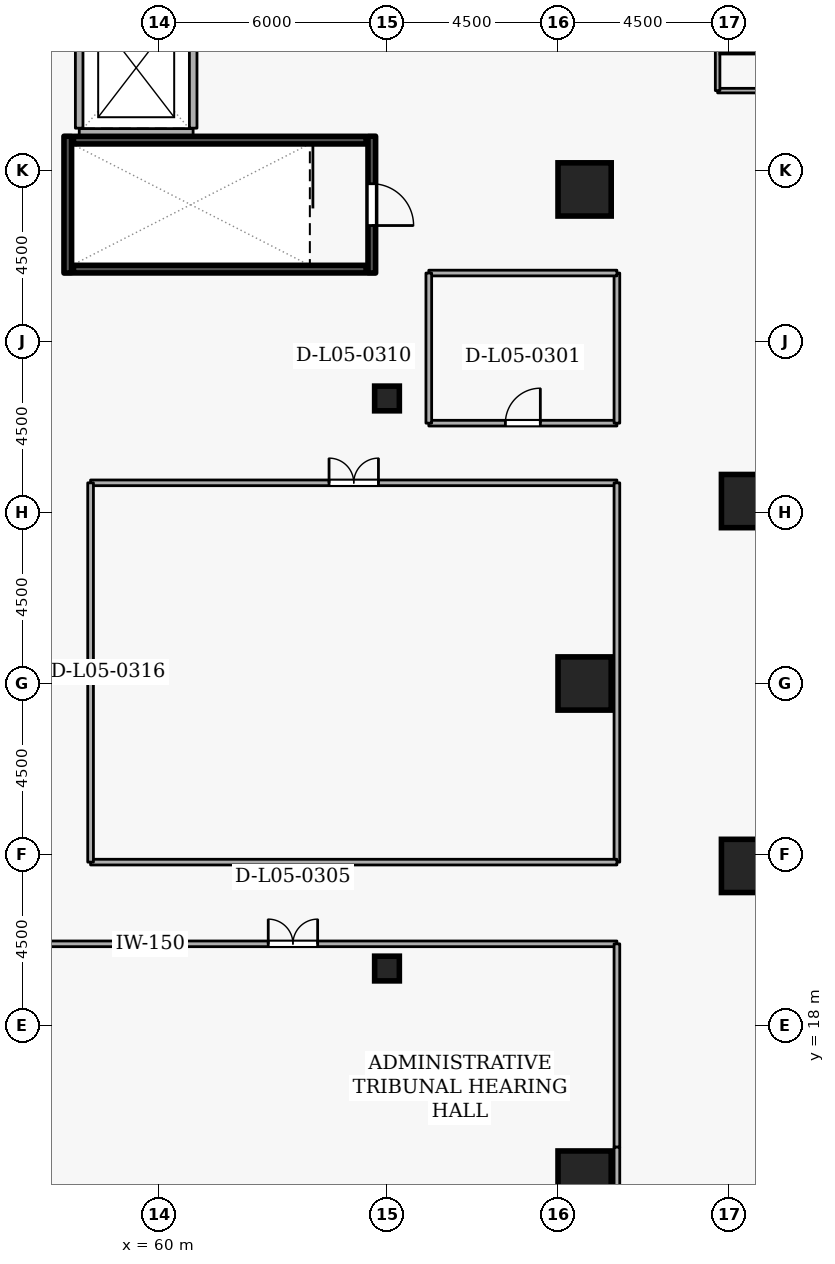
"""IFC4 building model, lengths in metres.
Left out: names, types, materials, properties, quantities, classifications, styles, units other than length and angle.
Written with IfcOpenShell. Run it as: python <this file> out.ifc"""

import sys

from ifc_helpers import new_model, si_unit, direction, frame, frame_2d, origin, origin_2d, place, context, subcontext, project, spatial, rectangle, extrude, element, fill, save


model = new_model("IFC4")
c1 = context("Model", 3, precision=1e-05, world=origin(), true_north=direction((0.0, 1.0)))
c2 = subcontext(c1, "Body", "Model", "MODEL_VIEW")
j1 = project(units=[si_unit("LENGTHUNIT", "METRE"), si_unit("PLANEANGLEUNIT", "RADIAN")], contexts=[c1])
p1 = place(None, origin())
s1 = spatial("IfcSite", under=j1, at=p1, CompositionType="ELEMENT")
p2 = place(p1, origin())
s2 = spatial("IfcBuilding", under=s1, at=p2, CompositionType="ELEMENT")
p3 = place(p2, frame((0.0, 0.0, 23.1)))
s3 = spatial("IfcBuildingStorey", under=s2, at=p3, CompositionType="ELEMENT", Elevation=23.1)
for number, where, z_axis, x_axis in (
    (1, (71.2, 14.0, 0.0), (0.0, 0.0, 1.0), (1.0, 0.0, 0.0)),
    (2, (71.2, 27.0, 0.0), (0.0, 0.0, 1.0), (1.0, 0.0, 0.0)),
    (3, (71.2, 40.0, 0.0), (0.0, 0.0, 1.0), (1.0, 0.0, 0.0)),
    (4, (75.5, 22.2, 0.0), (0.0, 0.0, 1.0), (1.0, 0.0, 0.0)),
    (5, (75.5, 31.8, 0.0), (0.0, 0.0, 1.0), (1.0, 0.0, 0.0)),
):
    element("IfcColumn", number, at=place(p3, frame(where, z_axis=z_axis, x_axis=x_axis)), inside=s3, PredefinedType="COLUMN", context=c2, shape_type="SweptSolid", body=[
        extrude(rectangle(XDim=1.4, YDim=1.4, at=origin_2d()), origin(), (0.0, 0.0, 1.0), 4.8),
    ])
for number, where, z_axis, x_axis in (
    (6, (66.0, 19.5, 0.0), (0.0, 0.0, 1.0), (1.0, 0.0, 0.0)),
    (7, (66.0, 34.5, 0.0), (0.0, 0.0, 1.0), (1.0, 0.0, 0.0)),
):
    element("IfcColumn", number, at=place(p3, frame(where, z_axis=z_axis, x_axis=x_axis)), inside=s3, PredefinedType="COLUMN", context=c2, shape_type="SweptSolid", body=[
        extrude(rectangle(XDim=0.65, YDim=0.65, at=origin_2d()), origin(), (0.0, 0.0, 1.0), 4.8),
    ])
p4 = place(p3, frame((57.902, 41.5, 0.0), z_axis=(0.0, 0.0, 1.0), x_axis=(1.0, 0.0, 0.0)))
e8 = element("IfcWall", 8, at=p4, inside=s3, PredefinedType="STANDARD", context=c2, shape_type="SweptSolid", body=[
    extrude(rectangle(XDim=2.996, YDim=0.2, at=frame_2d((1.498, 0.0))), origin(), (0.0, 0.0, 1.0), 4.54),
])
for number, where, z_axis, x_axis in (
    (9, (60.9, 41.612, 0.0), (0.0, 0.0, 1.0), (0.0, 1.0, 0.0)),
    (10, (57.9, 41.612, 0.0), (0.0, 0.0, 1.0), (0.0, 1.0, 0.0)),
):
    element("IfcWall", number, at=place(p3, frame(where, z_axis=z_axis, x_axis=x_axis)), inside=s3, PredefinedType="STANDARD", context=c2, shape_type="SweptSolid", body=[
        extrude(rectangle(XDim=3.286, YDim=0.2, at=frame_2d((1.643, 0.0))), origin(), (0.0, 0.0, 1.0), 4.54),
    ])
p5 = place(p3, frame((65.6, 41.4, 0.0), z_axis=(0.0, 0.0, 1.0), x_axis=(0.0, -1.0, 0.0)))
e11 = element("IfcWall", 11, at=p5, inside=s3, PredefinedType="SHEAR", context=c2, shape_type="SweptSolid", body=[
    extrude(rectangle(XDim=3.6, YDim=0.2, at=frame_2d((1.8, 0.0))), origin(), (0.0, 0.0, 1.0), 4.8),
])
p6 = place(p5, frame((1.25, 0.0, 0.0)))
e12 = element("IfcOpeningElement", 12, at=p6, cuts=e11, PredefinedType="OPENING", context=c2, shape_type="SweptSolid", body=[
    extrude(rectangle(XDim=1.1, YDim=2.1, at=frame_2d((0.55, 1.05))), frame((0.0, 0.11, 0.0), z_axis=(0.0, -1.0, 0.0), x_axis=(1.0, 0.0, 0.0)), (0.0, 0.0, 1.0), 0.22),
])
p7 = place(p3, frame((57.6, 37.8, 0.0), z_axis=(0.0, 0.0, 1.0), x_axis=(0.0, 1.0, 0.0)))
e13 = element("IfcWall", 13, at=p7, inside=s3, PredefinedType="SHEAR", context=c2, shape_type="SweptSolid", body=[
    extrude(rectangle(XDim=3.6, YDim=0.2, at=frame_2d((1.8, 0.0))), origin(), (0.0, 0.0, 1.0), 4.8),
])
for number, where, z_axis, x_axis in (
    (14, (57.75, 37.903, 0.0), (0.0, 0.0, 1.0), (1.0, 0.0, 0.0)),
    (15, (65.45, 41.297, 0.0), (0.0, 0.0, 1.0), (-1.0, 0.0, 0.0)),
):
    element("IfcWall", number, at=place(p3, frame(where, z_axis=z_axis, x_axis=x_axis)), inside=s3, PredefinedType="SHEAR", context=c2, shape_type="SweptSolid", body=[
        extrude(rectangle(XDim=7.7, YDim=0.2, at=frame_2d((3.85, 0.0))), origin(), (0.0, 0.0, 1.0), 4.8),
    ])
p8 = place(p3, frame((67.1, 33.85, 0.0), z_axis=(0.0, 0.0, 1.0), x_axis=(1.0, 0.0, 0.0)))
e16 = element("IfcWall", 16, at=p8, inside=s3, PredefinedType="PARTITIONING", context=c2, shape_type="SweptSolid", body=[
    extrude(rectangle(XDim=4.95, YDim=0.15, at=frame_2d((2.475, 0.0))), origin(), (0.0, 0.0, 1.0), 4.54),
])
p9 = place(p8, frame((2.015, 0.0, 0.0)))
e17 = element("IfcOpeningElement", 17, at=p9, cuts=e16, PredefinedType="OPENING", context=c2, shape_type="SweptSolid", body=[
    extrude(rectangle(XDim=0.92, YDim=2.08, at=frame_2d((0.46, 1.04))), frame((0.0, 0.085, 0.0), z_axis=(0.0, -1.0, 0.0), x_axis=(1.0, 0.0, 0.0)), (0.0, 0.0, 1.0), 0.17),
])
p10 = place(p3, frame((72.05, 33.85, 0.0), z_axis=(0.0, 0.0, 1.0), x_axis=(0.0, 1.0, 0.0)))
e18 = element("IfcWall", 18, at=p10, inside=s3, PredefinedType="PARTITIONING", context=c2, shape_type="SweptSolid", body=[
    extrude(rectangle(XDim=3.95, YDim=0.15, at=frame_2d((1.975, 0.0))), origin(), (0.0, 0.0, 1.0), 4.54),
])
p11 = place(p3, frame((72.05, 37.8, 0.0), z_axis=(0.0, 0.0, 1.0), x_axis=(-1.0, 0.0, 0.0)))
e19 = element("IfcWall", 19, at=p11, inside=s3, PredefinedType="PARTITIONING", context=c2, shape_type="SweptSolid", body=[
    extrude(rectangle(XDim=4.95, YDim=0.15, at=frame_2d((2.475, 0.0))), origin(), (0.0, 0.0, 1.0), 4.54),
])
p12 = place(p3, frame((67.1, 37.8, 0.0), z_axis=(0.0, 0.0, 1.0), x_axis=(0.0, -1.0, 0.0)))
e20 = element("IfcWall", 20, at=p12, inside=s3, PredefinedType="PARTITIONING", context=c2, shape_type="SweptSolid", body=[
    extrude(rectangle(XDim=3.95, YDim=0.15, at=frame_2d((1.975, 0.0))), origin(), (0.0, 0.0, 1.0), 4.54),
])
p13 = place(p3, frame((55.0, 20.15, 0.0), z_axis=(0.0, 0.0, 1.0), x_axis=(1.0, 0.0, 0.0)))
e21 = element("IfcWall", 21, at=p13, inside=s3, PredefinedType="PARTITIONING", context=c2, shape_type="SweptSolid", body=[
    extrude(rectangle(XDim=17.05, YDim=0.15, at=frame_2d((8.525, 0.0))), origin(), (0.0, 0.0, 1.0), 4.54),
])
p14 = place(p13, frame((7.875, 0.0, 0.0)))
e22 = element("IfcOpeningElement", 22, at=p14, cuts=e21, PredefinedType="OPENING", context=c2, shape_type="SweptSolid", body=[
    extrude(rectangle(XDim=1.3, YDim=2.12, at=frame_2d((0.65, 1.06))), frame((0.0, 0.085, 0.0), z_axis=(0.0, -1.0, 0.0), x_axis=(1.0, 0.0, 0.0)), (0.0, 0.0, 1.0), 0.17),
])
p15 = place(p3, frame((72.05, 20.15, 0.0), z_axis=(0.0, 0.0, 1.0), x_axis=(0.0, -1.0, 0.0)))
e23 = element("IfcWall", 23, at=p15, inside=s3, PredefinedType="PARTITIONING", context=c2, shape_type="SweptSolid", body=[
    extrude(rectangle(XDim=5.35, YDim=0.15, at=frame_2d((2.675, 0.0))), origin(), (0.0, 0.0, 1.0), 4.54),
])
p16 = place(p3, frame((72.05, 14.8, 0.0), z_axis=(0.0, 0.0, 1.0), x_axis=(0.0, -1.0, 0.0)))
e24 = element("IfcWall", 24, at=p16, inside=s3, PredefinedType="PARTITIONING", context=c2, shape_type="SweptSolid", body=[
    extrude(rectangle(XDim=2.48, YDim=0.15, at=frame_2d((1.24, 0.0))), origin(), (0.0, 0.0, 1.0), 4.54),
])
p17 = place(p3, frame((58.2, 32.28, 0.0), z_axis=(0.0, 0.0, 1.0), x_axis=(1.0, 0.0, 0.0)))
e25 = element("IfcWall", 25, at=p17, inside=s3, PredefinedType="PARTITIONING", context=c2, shape_type="SweptSolid", body=[
    extrude(rectangle(XDim=13.85, YDim=0.15, at=frame_2d((6.925, 0.0))), origin(), (0.0, 0.0, 1.0), 4.54),
])
p18 = place(p17, frame((6.275, 0.0, 0.0)))
e26 = element("IfcOpeningElement", 26, at=p18, cuts=e25, PredefinedType="OPENING", context=c2, shape_type="SweptSolid", body=[
    extrude(rectangle(XDim=1.3, YDim=2.12, at=frame_2d((0.65, 1.06))), frame((0.0, 0.085, 0.0), z_axis=(0.0, -1.0, 0.0), x_axis=(1.0, 0.0, 0.0)), (0.0, 0.0, 1.0), 0.17),
])
p19 = place(p3, frame((72.05, 32.28, 0.0), z_axis=(0.0, 0.0, 1.0), x_axis=(0.0, -1.0, 0.0)))
e27 = element("IfcWall", 27, at=p19, inside=s3, PredefinedType="PARTITIONING", context=c2, shape_type="SweptSolid", body=[
    extrude(rectangle(XDim=9.98, YDim=0.15, at=frame_2d((4.99, 0.0))), origin(), (0.0, 0.0, 1.0), 4.54),
])
p20 = place(p3, frame((72.05, 22.3, 0.0), z_axis=(0.0, 0.0, 1.0), x_axis=(-1.0, 0.0, 0.0)))
e28 = element("IfcWall", 28, at=p20, inside=s3, PredefinedType="PARTITIONING", context=c2, shape_type="SweptSolid", body=[
    extrude(rectangle(XDim=13.85, YDim=0.15, at=frame_2d((6.925, 0.0))), origin(), (0.0, 0.0, 1.0), 4.54),
])
p21 = place(p3, frame((58.2, 22.3, 0.0), z_axis=(0.0, 0.0, 1.0), x_axis=(0.0, 1.0, 0.0)))
e29 = element("IfcWall", 29, at=p21, inside=s3, PredefinedType="PARTITIONING", context=c2, shape_type="SweptSolid", body=[
    extrude(rectangle(XDim=9.98, YDim=0.15, at=frame_2d((4.99, 0.0))), origin(), (0.0, 0.0, 1.0), 4.54),
])
p22 = place(p3, frame((93.3, 42.6, 0.0), z_axis=(0.0, 0.0, 1.0), x_axis=(-1.0, 0.0, 0.0)))
e30 = element("IfcWall", 30, at=p22, inside=s3, PredefinedType="PARTITIONING", context=c2, shape_type="SweptSolid", body=[
    extrude(rectangle(XDim=18.6, YDim=0.12, at=frame_2d((9.3, 0.0))), origin(), (0.0, 0.0, 1.0), 4.54),
])
p23 = place(p22, frame((8.775, 0.0, 0.0)))
e31 = element("IfcOpeningElement", 31, at=p23, cuts=e30, PredefinedType="OPENING", context=c2, shape_type="SweptSolid", body=[
    extrude(rectangle(XDim=1.05, YDim=2.1, at=frame_2d((0.525, 1.05))), frame((0.0, 0.07, 0.0), z_axis=(0.0, -1.0, 0.0), x_axis=(1.0, 0.0, 0.0)), (0.0, 0.0, 1.0), 0.14),
])
p24 = place(p3, frame((74.7, 42.6, 0.0), z_axis=(0.0, 0.0, 1.0), x_axis=(0.0, 1.0, 0.0)))
e32 = element("IfcWall", 32, at=p24, inside=s3, PredefinedType="PARTITIONING", context=c2, shape_type="SweptSolid", body=[
    extrude(rectangle(XDim=6.58, YDim=0.12, at=frame_2d((3.29, 0.0))), origin(), (0.0, 0.0, 1.0), 4.54),
])
p25 = place(p6, origin())
e33 = element("IfcDoor", 33, at=p25, inside=s3, OperationType="SINGLE_SWING_RIGHT", PredefinedType="DOOR", context=c2, shape_type="SweptSolid", body=[
    extrude(rectangle(XDim=1.1, YDim=2.1, at=frame_2d((0.55, 1.05))), frame((0.0, 0.025, 0.0), z_axis=(0.0, -1.0, 0.0), x_axis=(1.0, 0.0, 0.0)), (0.0, 0.0, 1.0), 0.05),
])
fill(e12, e33)
p26 = place(p9, origin())
e34 = element("IfcDoor", 34, at=p26, inside=s3, OperationType="SINGLE_SWING_RIGHT", PredefinedType="DOOR", context=c2, shape_type="SweptSolid", body=[
    extrude(rectangle(XDim=0.92, YDim=2.08, at=frame_2d((0.46, 1.04))), frame((0.0, 0.025, 0.0), z_axis=(0.0, -1.0, 0.0), x_axis=(1.0, 0.0, 0.0)), (0.0, 0.0, 1.0), 0.05),
])
fill(e17, e34)
p27 = place(p14, origin())
e35 = element("IfcDoor", 35, at=p27, inside=s3, OperationType="DOUBLE_DOOR_SINGLE_SWING", PredefinedType="DOOR", context=c2, shape_type="SweptSolid", body=[
    extrude(rectangle(XDim=1.3, YDim=2.12, at=frame_2d((0.65, 1.06))), frame((0.0, 0.025, 0.0), z_axis=(0.0, -1.0, 0.0), x_axis=(1.0, 0.0, 0.0)), (0.0, 0.0, 1.0), 0.05),
])
fill(e22, e35)
p28 = place(p18, origin())
e36 = element("IfcDoor", 36, at=p28, inside=s3, OperationType="DOUBLE_DOOR_SINGLE_SWING", PredefinedType="DOOR", context=c2, shape_type="SweptSolid", body=[
    extrude(rectangle(XDim=1.3, YDim=2.12, at=frame_2d((0.65, 1.06))), frame((0.0, 0.025, 0.0), z_axis=(0.0, -1.0, 0.0), x_axis=(1.0, 0.0, 0.0)), (0.0, 0.0, 1.0), 0.05),
])
fill(e26, e36)
save(model, sys.argv[1])
